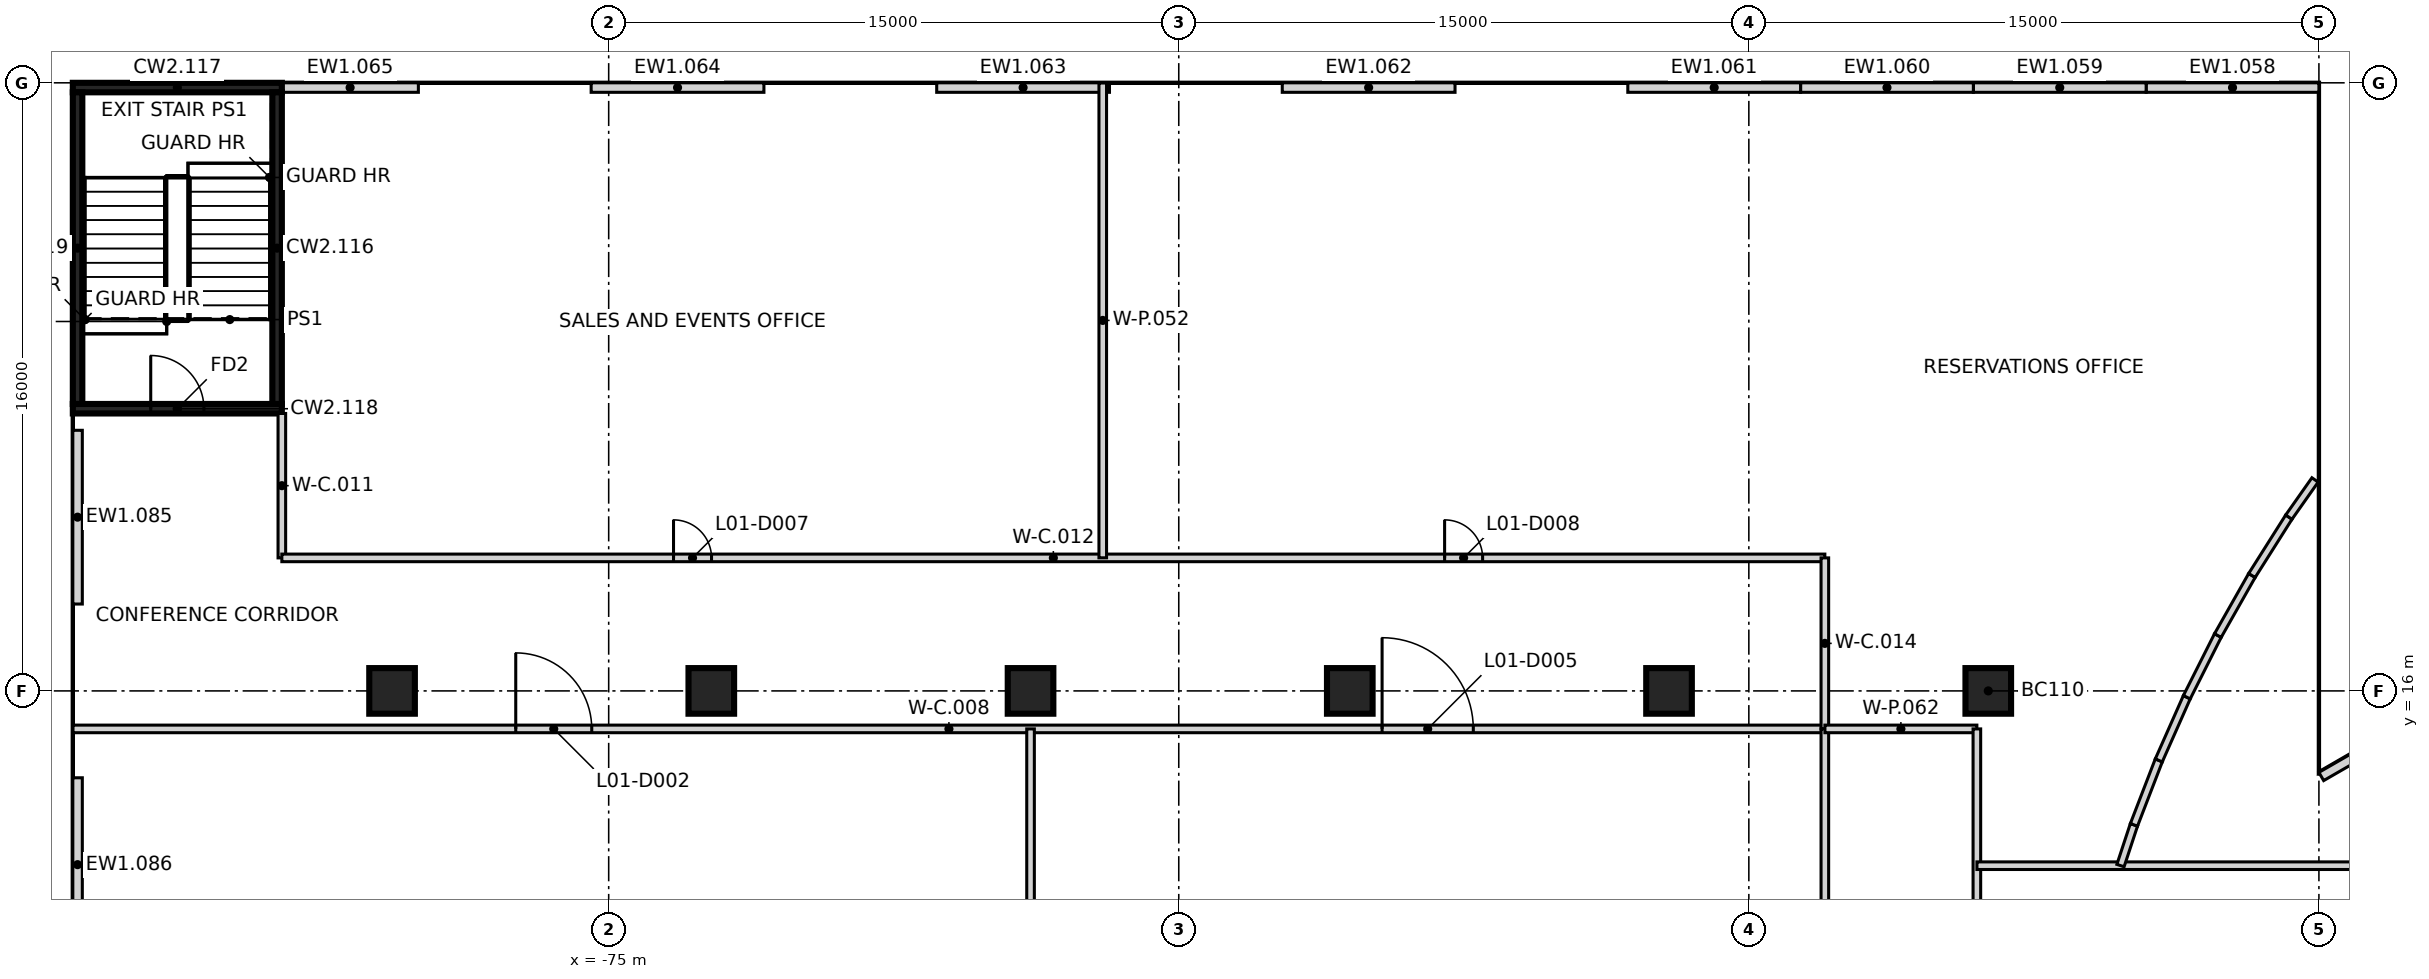
"""IFC4 building model, lengths in metres.
Left out: names, types, materials, properties, quantities, classifications, styles, units other than length and angle.
Written with IfcOpenShell. Run it as: python <this file> out.ifc"""

import sys

from ifc_helpers import new_model, si_unit, direction, frame, frame_2d, origin, origin_2d, place, context, subcontext, project, spatial, rectangle, extrude, element, fill, save


model = new_model("IFC4")
c1 = context("Model", 3, precision=1e-05, world=origin(), true_north=direction((0.0, 1.0)))
c2 = subcontext(c1, "Body", "Model", "MODEL_VIEW")
j1 = project(units=[si_unit("LENGTHUNIT", "METRE"), si_unit("PLANEANGLEUNIT", "RADIAN")], contexts=[c1])
p1 = place(None, origin())
s1 = spatial("IfcSite", under=j1, at=p1, CompositionType="ELEMENT")
p2 = place(p1, origin())
s2 = spatial("IfcBuilding", under=s1, at=p2, CompositionType="ELEMENT")
p3 = place(p2, frame((0.0, 0.0, 7.5)))
s3 = spatial("IfcBuildingStorey", under=s2, at=p3, CompositionType="ELEMENT", Elevation=7.5)
for number, where, z_axis, x_axis in (
    (1, (-80.7, 16.0, -0.4), (0.0, 0.0, 1.0), (1.0, 0.0, 0.0)),
    (2, (-72.3, 16.0, -0.4), (0.0, 0.0, 1.0), (1.0, 0.0, 0.0)),
    (3, (-63.9, 16.0, -0.4), (0.0, 0.0, 1.0), (1.0, 0.0, 0.0)),
    (4, (-55.5, 16.0, -0.4), (0.0, 0.0, 1.0), (1.0, 0.0, 0.0)),
    (5, (-47.1, 16.0, -0.4), (0.0, 0.0, 1.0), (1.0, 0.0, 0.0)),
    (6, (-38.7, 16.0, -0.4), (0.0, 0.0, 1.0), (1.0, 0.0, 0.0)),
):
    element("IfcColumn", number, at=place(p3, frame(where, z_axis=z_axis, x_axis=x_axis)), inside=s3, PredefinedType="COLUMN", context=c2, shape_type="SweptSolid", body=[
        extrude(rectangle(XDim=1.2, YDim=1.2, at=origin_2d()), origin(), (0.0, 0.0, 1.0), 6.55),
    ])
p4 = place(p3, frame((-29.938, 13.748, 0.0), z_axis=(0.0, 0.0, 1.0), x_axis=(0.866193503994, 0.4997087288, 0.0)))
e7 = element("IfcWall", 7, at=p4, inside=s3, PredefinedType="SOLIDWALL", context=c2, shape_type="SweptSolid", body=[
    extrude(rectangle(XDim=4.62, YDim=0.25, at=frame_2d((2.31, 0.0))), origin(), (0.0, 0.0, 1.0), 6.15),
])
for number, where, z_axis, x_axis in (
    (8, (-34.546, 31.875, 0.0), (0.0, 0.0, 1.0), (1.0, 0.0, 0.0)),
    (9, (-39.092, 31.875, 0.0), (0.0, 0.0, 1.0), (1.0, 0.0, 0.0)),
    (10, (-43.638, 31.875, 0.0), (0.0, 0.0, 1.0), (1.0, 0.0, 0.0)),
    (11, (-48.185, 31.875, 0.0), (0.0, 0.0, 1.0), (1.0, 0.0, 0.0)),
    (12, (-57.277, 31.875, 0.0), (0.0, 0.0, 1.0), (1.0, 0.0, 0.0)),
    (13, (-66.369, 31.875, 0.0), (0.0, 0.0, 1.0), (1.0, 0.0, 0.0)),
    (14, (-75.461, 31.875, 0.0), (0.0, 0.0, 1.0), (1.0, 0.0, 0.0)),
):
    element("IfcWall", number, at=place(p3, frame(where, z_axis=z_axis, x_axis=x_axis)), inside=s3, PredefinedType="SOLIDWALL", context=c2, shape_type="SweptSolid", body=[
        extrude(rectangle(XDim=4.546, YDim=0.25, at=frame_2d((2.273, 0.0))), origin(), (0.0, 0.0, 1.0), 6.15),
    ])
p5 = place(p3, frame((-83.6, 31.875, 0.0), z_axis=(0.0, 0.0, 1.0), x_axis=(1.0, 0.0, 0.0)))
e15 = element("IfcWall", 15, at=p5, inside=s3, PredefinedType="SOLIDWALL", context=c2, shape_type="SweptSolid", body=[
    extrude(rectangle(XDim=3.592, YDim=0.25, at=frame_2d((1.796, 0.0))), origin(), (0.0, 0.0, 1.0), 6.15),
])
for number, where, z_axis, x_axis in (
    (16, (-88.975, 18.286, 0.0), (0.0, 0.0, 1.0), (0.0, 1.0, 0.0)),
    (17, (-88.975, 9.143, 0.0), (0.0, 0.0, 1.0), (0.0, 1.0, 0.0)),
):
    element("IfcWall", number, at=place(p3, frame(where, z_axis=z_axis, x_axis=x_axis)), inside=s3, PredefinedType="SOLIDWALL", context=c2, shape_type="SweptSolid", body=[
        extrude(rectangle(XDim=4.572, YDim=0.25, at=frame_2d((2.286, 0.0))), origin(), (0.0, 0.0, 1.0), 6.15),
    ])
p6 = place(p3, frame((-89.1, 23.425, 0.0), z_axis=(0.0, 0.0, 1.0), x_axis=(1.0, 0.0, 0.0)))
e18 = element("IfcWall", 18, at=p6, inside=s3, PredefinedType="SHEAR", context=c2, shape_type="SweptSolid", body=[
    extrude(rectangle(XDim=5.5, YDim=0.25, at=frame_2d((2.75, 0.0))), origin(), (0.0, 0.0, 1.0), 6.15),
])
p7 = place(p6, frame((2.05, 0.0, 0.0)))
e19 = element("IfcOpeningElement", 19, at=p7, cuts=e18, PredefinedType="OPENING", context=c2, shape_type="SweptSolid", body=[
    extrude(rectangle(XDim=1.4, YDim=2.1, at=frame_2d((0.7, 1.05))), frame((0.0, 0.135, 0.0), z_axis=(0.0, -1.0, 0.0), x_axis=(1.0, 0.0, 0.0)), (0.0, 0.0, 1.0), 0.27),
])
p8 = place(p3, frame((-89.1, 31.875, 0.0), z_axis=(0.0, 0.0, 1.0), x_axis=(1.0, 0.0, 0.0)))
e20 = element("IfcWall", 20, at=p8, inside=s3, PredefinedType="SHEAR", context=c2, shape_type="SweptSolid", body=[
    extrude(rectangle(XDim=5.5, YDim=0.25, at=frame_2d((2.75, 0.0))), origin(), (0.0, 0.0, 1.0), 6.15),
])
for number, where, z_axis, x_axis in (
    (21, (-88.975, 23.55, 0.0), (0.0, 0.0, 1.0), (0.0, 1.0, 0.0)),
    (22, (-83.725, 23.55, 0.0), (0.0, 0.0, 1.0), (0.0, 1.0, 0.0)),
):
    element("IfcWall", number, at=place(p3, frame(where, z_axis=z_axis, x_axis=x_axis)), inside=s3, PredefinedType="SHEAR", context=c2, shape_type="SweptSolid", body=[
        extrude(rectangle(XDim=8.2, YDim=0.25, at=frame_2d((4.1, 0.0))), origin(), (0.0, 0.0, 1.0), 6.15),
    ])
p9 = place(p3, frame((-89.095, 15.0, 0.0), z_axis=(0.0, 0.0, 1.0), x_axis=(1.0, 0.0, 0.0)))
e23 = element("IfcWall", 23, at=p9, inside=s3, PredefinedType="PARTITIONING", context=c2, shape_type="SweptSolid", body=[
    extrude(rectangle(XDim=46.095, YDim=0.2, at=frame_2d((23.047, 0.0))), origin(), (0.0, 0.0, 1.0), 6.15),
])
p10 = place(p9, frame((11.649, 0.0, 0.0)))
e24 = element("IfcOpeningElement", 24, at=p10, cuts=e23, PredefinedType="OPENING", context=c2, shape_type="SweptSolid", body=[
    extrude(rectangle(XDim=2.0, YDim=2.1, at=frame_2d((1.0, 1.05))), frame((0.0, 0.11, 0.0), z_axis=(0.0, -1.0, 0.0), x_axis=(1.0, 0.0, 0.0)), (0.0, 0.0, 1.0), 0.22),
])
p11 = place(p9, frame((34.445, 0.0, 0.0)))
e25 = element("IfcOpeningElement", 25, at=p11, cuts=e23, PredefinedType="OPENING", context=c2, shape_type="SweptSolid", body=[
    extrude(rectangle(XDim=2.4, YDim=2.1, at=frame_2d((1.2, 1.05))), frame((0.0, 0.11, 0.0), z_axis=(0.0, -1.0, 0.0), x_axis=(1.0, 0.0, 0.0)), (0.0, 0.0, 1.0), 0.22),
])
p12 = place(p3, frame((-83.6, 19.5, 0.0), z_axis=(0.0, 0.0, 1.0), x_axis=(0.0, 1.0, 0.0)))
e26 = element("IfcWall", 26, at=p12, inside=s3, PredefinedType="PARTITIONING", context=c2, shape_type="SweptSolid", body=[
    extrude(rectangle(XDim=3.8, YDim=0.2, at=frame_2d((1.9, 0.0))), origin(), (0.0, 0.0, 1.0), 6.15),
])
p13 = place(p3, frame((-83.6, 19.5, 0.0), z_axis=(0.0, 0.0, 1.0), x_axis=(1.0, 0.0, 0.0)))
e27 = element("IfcWall", 27, at=p13, inside=s3, PredefinedType="PARTITIONING", context=c2, shape_type="SweptSolid", body=[
    extrude(rectangle(XDim=40.6, YDim=0.2, at=frame_2d((20.3, 0.0))), origin(), (0.0, 0.0, 1.0), 6.15),
])
p14 = place(p13, frame((10.306, 0.0, 0.0)))
e28 = element("IfcOpeningElement", 28, at=p14, cuts=e27, PredefinedType="OPENING", context=c2, shape_type="SweptSolid", body=[
    extrude(rectangle(XDim=1.0, YDim=2.1, at=frame_2d((0.5, 1.05))), frame((0.0, 0.11, 0.0), z_axis=(0.0, -1.0, 0.0), x_axis=(1.0, 0.0, 0.0)), (0.0, 0.0, 1.0), 0.22),
])
p15 = place(p13, frame((30.595, 0.0, 0.0)))
e29 = element("IfcOpeningElement", 29, at=p15, cuts=e27, PredefinedType="OPENING", context=c2, shape_type="SweptSolid", body=[
    extrude(rectangle(XDim=1.0, YDim=2.1, at=frame_2d((0.5, 1.05))), frame((0.0, 0.11, 0.0), z_axis=(0.0, -1.0, 0.0), x_axis=(1.0, 0.0, 0.0)), (0.0, 0.0, 1.0), 0.22),
])
p16 = place(p3, frame((-43.0, 15.002, 0.0), z_axis=(0.0, 0.0, 1.0), x_axis=(0.0, 1.0, 0.0)))
e30 = element("IfcWall", 30, at=p16, inside=s3, PredefinedType="PARTITIONING", context=c2, shape_type="SweptSolid", body=[
    extrude(rectangle(XDim=4.498, YDim=0.2, at=frame_2d((2.249, 0.0))), origin(), (0.0, 0.0, 1.0), 6.15),
])
p17 = place(p3, frame((-63.9, -15.0, 0.0), z_axis=(0.0, 0.0, 1.0), x_axis=(0.0, 1.0, 0.0)))
e31 = element("IfcWall", 31, at=p17, inside=s3, PredefinedType="PARTITIONING", context=c2, shape_type="SweptSolid", body=[
    extrude(rectangle(XDim=30.0, YDim=0.2, at=frame_2d((15.0, 0.0))), origin(), (0.0, 0.0, 1.0), 6.15),
])
p18 = place(p17, frame((11.25, 0.0, 0.0)))
e32 = element("IfcOpeningElement", 32, at=p18, cuts=e31, PredefinedType="OPENING", context=c2, shape_type="SweptSolid", body=[
    extrude(rectangle(XDim=2.0, YDim=2.1, at=frame_2d((1.0, 1.05))), frame((0.0, 0.11, 0.0), z_axis=(0.0, -1.0, 0.0), x_axis=(1.0, 0.0, 0.0)), (0.0, 0.0, 1.0), 0.22),
])
p19 = place(p3, frame((-62.0, 19.502, 0.0), z_axis=(0.0, 0.0, 1.0), x_axis=(0.0, 1.0, 0.0)))
e33 = element("IfcWall", 33, at=p19, inside=s3, PredefinedType="PARTITIONING", context=c2, shape_type="SweptSolid", body=[
    extrude(rectangle(XDim=12.493, YDim=0.2, at=frame_2d((6.247, 0.0))), origin(), (0.0, 0.0, 1.0), 6.15),
])
p20 = place(p3, frame((-43.0, 5.5, 0.0), z_axis=(0.0, 0.0, 1.0), x_axis=(0.0, 1.0, 0.0)))
e34 = element("IfcWall", 34, at=p20, inside=s3, PredefinedType="PARTITIONING", context=c2, shape_type="SweptSolid", body=[
    extrude(rectangle(XDim=9.5, YDim=0.2, at=frame_2d((4.75, 0.0))), origin(), (0.0, 0.0, 1.0), 6.15),
])
p21 = place(p3, frame((-42.998, 15.0, 0.0), z_axis=(0.0, 0.0, 1.0), x_axis=(1.0, 0.0, 0.0)))
e35 = element("IfcWall", 35, at=p21, inside=s3, PredefinedType="PARTITIONING", context=c2, shape_type="SweptSolid", body=[
    extrude(rectangle(XDim=3.998, YDim=0.2, at=frame_2d((1.999, 0.0))), origin(), (0.0, 0.0, 1.0), 6.15),
])
p22 = place(p3, frame((-39.0, -15.0, 0.0), z_axis=(0.0, 0.0, 1.0), x_axis=(0.0, 1.0, 0.0)))
e36 = element("IfcWall", 36, at=p22, inside=s3, PredefinedType="PARTITIONING", context=c2, shape_type="SweptSolid", body=[
    extrude(rectangle(XDim=30.0, YDim=0.2, at=frame_2d((15.0, 0.0))), origin(), (0.0, 0.0, 1.0), 6.15),
])
p23 = place(p22, frame((20.75, 0.0, 0.0)))
e37 = element("IfcOpeningElement", 37, at=p23, cuts=e36, PredefinedType="OPENING", context=c2, shape_type="SweptSolid", body=[
    extrude(rectangle(XDim=2.4, YDim=2.1, at=frame_2d((1.2, 1.05))), frame((0.0, 0.11, 0.0), z_axis=(0.0, -1.0, 0.0), x_axis=(1.0, 0.0, 0.0)), (0.0, 0.0, 1.0), 0.22),
])
p24 = place(p22, frame((8.305, 0.0, 0.0)))
e38 = element("IfcOpeningElement", 38, at=p24, cuts=e36, PredefinedType="OPENING", context=c2, shape_type="SweptSolid", body=[
    extrude(rectangle(XDim=0.9, YDim=2.1, at=frame_2d((0.45, 1.05))), frame((0.0, 0.11, 0.0), z_axis=(0.0, -1.0, 0.0), x_axis=(1.0, 0.0, 0.0)), (0.0, 0.0, 1.0), 0.22),
])
p25 = place(p3, frame((-38.998, 11.401, 0.0), z_axis=(0.0, 0.0, 1.0), x_axis=(1.0, 0.0, 0.0)))
e39 = element("IfcWall", 39, at=p25, inside=s3, PredefinedType="PARTITIONING", context=c2, shape_type="SweptSolid", body=[
    extrude(rectangle(XDim=29.998, YDim=0.2, at=frame_2d((14.999, 0.0))), origin(), (0.0, 0.0, 1.0), 3.75),
])
p26 = place(p25, frame((12.142, 0.0, 0.0)))
e40 = element("IfcOpeningElement", 40, at=p26, cuts=e39, PredefinedType="OPENING", context=c2, shape_type="SweptSolid", body=[
    extrude(rectangle(XDim=0.8, YDim=2.1, at=frame_2d((0.4, 1.05))), frame((0.0, 0.11, 0.0), z_axis=(0.0, -1.0, 0.0), x_axis=(1.0, 0.0, 0.0)), (0.0, 0.0, 1.0), 0.22),
])
p27 = place(p3, frame((-35.221, 11.404, 0.0), z_axis=(0.0, 0.0, 1.0), x_axis=(0.313566613152, 0.949566205757, 0.0)))
e41 = element("IfcWall", 41, at=p27, inside=s3, PredefinedType="PARTITIONING", context=c2, shape_type="SweptSolid", body=[
    extrude(rectangle(XDim=1.129, YDim=0.2, at=frame_2d((0.564, 0.0))), origin(), (0.0, 0.0, 1.0), 6.15),
])
for number, where, z_axis, x_axis in (
    (42, (-34.867, 12.476, 0.0), (0.0, 0.0, 1.0), (0.36, 0.933, 0.0)),
    (43, (-34.213, 14.172, 0.0), (0.0, 0.0, 1.0), (0.405, 0.914, 0.0)),
):
    element("IfcWall", number, at=place(p3, frame(where, z_axis=z_axis, x_axis=x_axis)), inside=s3, PredefinedType="PARTITIONING", context=c2, shape_type="SweptSolid", body=[
        extrude(rectangle(XDim=1.818, YDim=0.2, at=frame_2d((0.909, 0.0))), origin(), (0.0, 0.0, 1.0), 6.15),
    ])
p28 = place(p3, frame((-33.476, 15.834, 0.0), z_axis=(0.0, 0.0, 1.0), x_axis=(0.449684007343, 0.893187714615, 0.0)))
e44 = element("IfcWall", 44, at=p28, inside=s3, PredefinedType="PARTITIONING", context=c2, shape_type="SweptSolid", body=[
    extrude(rectangle(XDim=1.817, YDim=0.2, at=frame_2d((0.909, 0.0))), origin(), (0.0, 0.0, 1.0), 6.15),
])
p29 = place(p3, frame((-32.659, 17.457, 0.0), z_axis=(0.0, 0.0, 1.0), x_axis=(0.493270284448, 0.86987609835, 0.0)))
e45 = element("IfcWall", 45, at=p29, inside=s3, PredefinedType="PARTITIONING", context=c2, shape_type="SweptSolid", body=[
    extrude(rectangle(XDim=1.816, YDim=0.2, at=frame_2d((0.908, 0.0))), origin(), (0.0, 0.0, 1.0), 6.15),
])
p30 = place(p3, frame((-31.763, 19.037, 0.0), z_axis=(0.0, 0.0, 1.0), x_axis=(0.534735678729, 0.84501938078, 0.0)))
e46 = element("IfcWall", 46, at=p30, inside=s3, PredefinedType="PARTITIONING", context=c2, shape_type="SweptSolid", body=[
    extrude(rectangle(XDim=1.818, YDim=0.2, at=frame_2d((0.909, 0.0))), origin(), (0.0, 0.0, 1.0), 6.15),
])
p31 = place(p3, frame((-30.791, 20.573, 0.0), z_axis=(0.0, 0.0, 1.0), x_axis=(0.575897739976, 0.817521738605, 0.0)))
e47 = element("IfcWall", 47, at=p31, inside=s3, PredefinedType="PARTITIONING", context=c2, shape_type="SweptSolid", body=[
    extrude(rectangle(XDim=1.196, YDim=0.2, at=frame_2d((0.598, 0.0))), origin(), (0.0, 0.0, 1.0), 6.15),
])
p32 = place(p7, origin())
e48 = element("IfcDoor", 48, at=p32, inside=s3, OperationType="SINGLE_SWING_RIGHT", PredefinedType="DOOR", context=c2, shape_type="SweptSolid", body=[
    extrude(rectangle(XDim=1.4, YDim=2.1, at=frame_2d((0.7, 1.05))), frame((0.0, 0.025, 0.0), z_axis=(0.0, -1.0, 0.0), x_axis=(1.0, 0.0, 0.0)), (0.0, 0.0, 1.0), 0.05),
])
fill(e19, e48)
p33 = place(p10, frame((2.0, 0.0, 0.0), z_axis=(0.0, 0.0, 1.0), x_axis=(-1.0, 0.0, 0.0)))
e49 = element("IfcDoor", 49, at=p33, inside=s3, OperationType="DOUBLE_DOOR_SINGLE_SWING", PredefinedType="DOOR", context=c2, shape_type="SweptSolid", body=[
    extrude(rectangle(XDim=2.0, YDim=2.1, at=frame_2d((1.0, 1.05))), frame((0.0, 0.025, 0.0), z_axis=(0.0, -1.0, 0.0), x_axis=(1.0, 0.0, 0.0)), (0.0, 0.0, 1.0), 0.05),
])
fill(e24, e49)
p34 = place(p11, frame((2.4, 0.0, 0.0), z_axis=(0.0, 0.0, 1.0), x_axis=(-1.0, 0.0, 0.0)))
e50 = element("IfcDoor", 50, at=p34, inside=s3, OperationType="DOUBLE_DOOR_SINGLE_SWING", PredefinedType="DOOR", context=c2, shape_type="SweptSolid", body=[
    extrude(rectangle(XDim=2.4, YDim=2.1, at=frame_2d((1.2, 1.05))), frame((0.0, 0.025, 0.0), z_axis=(0.0, -1.0, 0.0), x_axis=(1.0, 0.0, 0.0)), (0.0, 0.0, 1.0), 0.05),
])
fill(e25, e50)
p35 = place(p14, origin())
e51 = element("IfcDoor", 51, at=p35, inside=s3, OperationType="SINGLE_SWING_LEFT", PredefinedType="DOOR", context=c2, shape_type="SweptSolid", body=[
    extrude(rectangle(XDim=1.0, YDim=2.1, at=frame_2d((0.5, 1.05))), frame((0.0, 0.025, 0.0), z_axis=(0.0, -1.0, 0.0), x_axis=(1.0, 0.0, 0.0)), (0.0, 0.0, 1.0), 0.05),
])
fill(e28, e51)
p36 = place(p15, origin())
e52 = element("IfcDoor", 52, at=p36, inside=s3, OperationType="SINGLE_SWING_LEFT", PredefinedType="DOOR", context=c2, shape_type="SweptSolid", body=[
    extrude(rectangle(XDim=1.0, YDim=2.1, at=frame_2d((0.5, 1.05))), frame((0.0, 0.025, 0.0), z_axis=(0.0, -1.0, 0.0), x_axis=(1.0, 0.0, 0.0)), (0.0, 0.0, 1.0), 0.05),
])
fill(e29, e52)
save(model, sys.argv[1])
